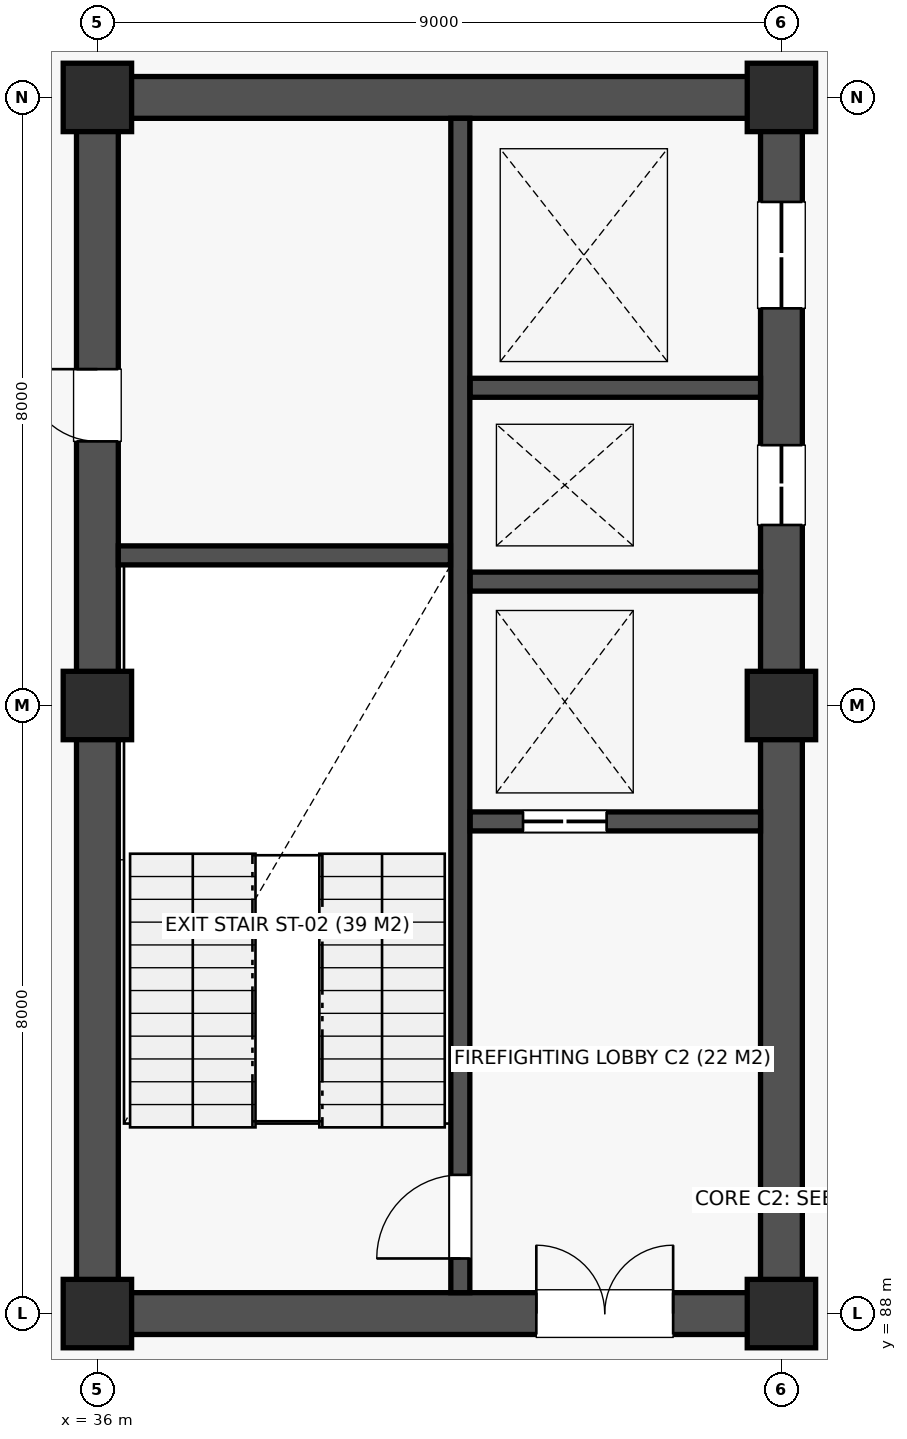
"""IFC4 building model, lengths in metres.
Left out: names, types, materials, properties, quantities, classifications, styles, units other than length and angle.
Written with IfcOpenShell. Run it as: python <this file> out.ifc"""

import sys

from ifc_helpers import new_model, si_unit, direction, frame, frame_2d, origin, origin_2d, place, context, subcontext, project, spatial, rectangle, extrude, element, fill, save


model = new_model("IFC4")
c1 = context("Model", 3, precision=1e-05, world=origin(), true_north=direction((0.0, 1.0)))
c2 = subcontext(c1, "Body", "Model", "MODEL_VIEW")
j1 = project(units=[si_unit("LENGTHUNIT", "METRE"), si_unit("PLANEANGLEUNIT", "RADIAN")], contexts=[c1])
p1 = place(None, origin())
s1 = spatial("IfcSite", under=j1, at=p1, CompositionType="ELEMENT")
p2 = place(p1, origin())
s2 = spatial("IfcBuilding", under=s1, at=p2, CompositionType="ELEMENT")
p3 = place(p2, frame((0.0, 0.0, 18.0)))
s3 = spatial("IfcBuildingStorey", under=s2, at=p3, CompositionType="ELEMENT", Elevation=18.0)
for number, where, z_axis, x_axis in (
    (1, (36.0, 88.0, 0.0), (0.0, 0.0, 1.0), (1.0, 0.0, 0.0)),
    (2, (36.0, 96.0, 0.0), (0.0, 0.0, 1.0), (1.0, 0.0, 0.0)),
    (3, (36.0, 104.0, 0.0), (0.0, 0.0, 1.0), (1.0, 0.0, 0.0)),
    (4, (45.0, 88.0, 0.0), (0.0, 0.0, 1.0), (1.0, 0.0, 0.0)),
    (5, (45.0, 96.0, 0.0), (0.0, 0.0, 1.0), (1.0, 0.0, 0.0)),
    (6, (45.0, 104.0, 0.0), (0.0, 0.0, 1.0), (1.0, 0.0, 0.0)),
):
    element("IfcColumn", number, at=place(p3, frame(where, z_axis=z_axis, x_axis=x_axis)), inside=s3, PredefinedType="COLUMN", context=c2, shape_type="SweptSolid", body=[
        extrude(rectangle(XDim=0.9, YDim=0.9, at=origin_2d()), origin(), (0.0, 0.0, 1.0), 3.9),
    ])
p4 = place(p3, frame((36.275, 88.0, 0.0), z_axis=(0.0, 0.0, 1.0), x_axis=(1.0, 0.0, 0.0)))
e7 = element("IfcWall", 7, at=p4, inside=s3, PredefinedType="SHEAR", context=c2, shape_type="SweptSolid", body=[
    extrude(rectangle(XDim=8.45, YDim=0.55, at=frame_2d((4.225, 0.0))), origin(), (0.0, 0.0, 1.0), 3.65),
])
p5 = place(p4, frame((5.5, 0.0, 0.0)))
e8 = element("IfcOpeningElement", 8, at=p5, cuts=e7, PredefinedType="OPENING", context=c2, shape_type="SweptSolid", body=[
    extrude(rectangle(XDim=1.8, YDim=2.18, at=frame_2d((0.9, 1.09))), frame((0.0, 0.287, 0.0), z_axis=(0.0, -1.0, 0.0), x_axis=(1.0, 0.0, 0.0)), (0.0, 0.0, 1.0), 0.574),
])
p6 = place(p3, frame((36.275, 104.0, 0.0), z_axis=(0.0, 0.0, 1.0), x_axis=(1.0, 0.0, 0.0)))
e9 = element("IfcWall", 9, at=p6, inside=s3, PredefinedType="SHEAR", context=c2, shape_type="SweptSolid", body=[
    extrude(rectangle(XDim=8.45, YDim=0.55, at=frame_2d((4.225, 0.0))), origin(), (0.0, 0.0, 1.0), 3.65),
])
p7 = place(p3, frame((36.0, 88.275, 0.0), z_axis=(0.0, 0.0, 1.0), x_axis=(0.0, 1.0, 0.0)))
e10 = element("IfcWall", 10, at=p7, inside=s3, PredefinedType="SHEAR", context=c2, shape_type="SweptSolid", body=[
    extrude(rectangle(XDim=15.45, YDim=0.55, at=frame_2d((7.725, 0.0))), origin(), (0.0, 0.0, 1.0), 3.65),
])
p8 = place(p7, frame((11.2, 0.0, 0.0)))
e11 = element("IfcOpeningElement", 11, at=p8, cuts=e10, PredefinedType="OPENING", context=c2, shape_type="SweptSolid", body=[
    extrude(rectangle(XDim=0.95, YDim=2.1, at=frame_2d((0.475, 1.05))), frame((0.0, 0.287, 0.0), z_axis=(0.0, -1.0, 0.0), x_axis=(1.0, 0.0, 0.0)), (0.0, 0.0, 1.0), 0.574),
])
p9 = place(p3, frame((45.0, 88.275, 0.0), z_axis=(0.0, 0.0, 1.0), x_axis=(0.0, 1.0, 0.0)))
e12 = element("IfcWall", 12, at=p9, inside=s3, PredefinedType="SHEAR", context=c2, shape_type="SweptSolid", body=[
    extrude(rectangle(XDim=15.45, YDim=0.55, at=frame_2d((7.725, 0.0))), origin(), (0.0, 0.0, 1.0), 3.65),
])
p10 = place(p9, frame((10.1, 0.0, 0.0)))
e13 = element("IfcOpeningElement", 13, at=p10, cuts=e12, PredefinedType="OPENING", context=c2, shape_type="SweptSolid", body=[
    extrude(rectangle(XDim=1.05, YDim=2.12, at=frame_2d((0.525, 1.06))), frame((0.0, 0.287, 0.0), z_axis=(0.0, -1.0, 0.0), x_axis=(1.0, 0.0, 0.0)), (0.0, 0.0, 1.0), 0.574),
])
p11 = place(p9, frame((12.95, 0.0, 0.0)))
e14 = element("IfcOpeningElement", 14, at=p11, cuts=e12, PredefinedType="OPENING", context=c2, shape_type="SweptSolid", body=[
    extrude(rectangle(XDim=1.4, YDim=2.2, at=frame_2d((0.7, 1.1))), frame((0.0, 0.287, 0.0), z_axis=(0.0, -1.0, 0.0), x_axis=(1.0, 0.0, 0.0)), (0.0, 0.0, 1.0), 0.574),
])
p12 = place(p3, frame((40.775, 88.275, 0.0), z_axis=(0.0, 0.0, 1.0), x_axis=(0.0, 1.0, 0.0)))
e15 = element("IfcWall", 15, at=p12, inside=s3, PredefinedType="SOLIDWALL", context=c2, shape_type="SweptSolid", body=[
    extrude(rectangle(XDim=15.45, YDim=0.25, at=frame_2d((7.725, 0.0))), origin(), (0.0, 0.0, 1.0), 3.65),
])
p13 = place(p12, frame((0.45, 0.0, 0.0)))
e16 = element("IfcOpeningElement", 16, at=p13, cuts=e15, PredefinedType="OPENING", context=c2, shape_type="SweptSolid", body=[
    extrude(rectangle(XDim=1.1, YDim=2.15, at=frame_2d((0.55, 1.075))), frame((0.0, 0.137, 0.0), z_axis=(0.0, -1.0, 0.0), x_axis=(1.0, 0.0, 0.0)), (0.0, 0.0, 1.0), 0.274),
])
p14 = place(p3, frame((36.275, 97.975, 0.0), z_axis=(0.0, 0.0, 1.0), x_axis=(1.0, 0.0, 0.0)))
e17 = element("IfcWall", 17, at=p14, inside=s3, PredefinedType="SOLIDWALL", context=c2, shape_type="SweptSolid", body=[
    extrude(rectangle(XDim=4.37, YDim=0.25, at=frame_2d((2.185, 0.0))), origin(), (0.0, 0.0, 1.0), 3.65),
])
p15 = place(p3, frame((40.905, 94.475, 0.0), z_axis=(0.0, 0.0, 1.0), x_axis=(1.0, 0.0, 0.0)))
e18 = element("IfcWall", 18, at=p15, inside=s3, PredefinedType="SOLIDWALL", context=c2, shape_type="SweptSolid", body=[
    extrude(rectangle(XDim=3.82, YDim=0.25, at=frame_2d((1.91, 0.0))), origin(), (0.0, 0.0, 1.0), 3.65),
])
p16 = place(p15, frame((0.695, 0.0, 0.0)))
e19 = element("IfcOpeningElement", 19, at=p16, cuts=e18, PredefinedType="OPENING", context=c2, shape_type="SweptSolid", body=[
    extrude(rectangle(XDim=1.1, YDim=2.12, at=frame_2d((0.55, 1.06))), frame((0.0, 0.137, 0.0), z_axis=(0.0, -1.0, 0.0), x_axis=(1.0, 0.0, 0.0)), (0.0, 0.0, 1.0), 0.274),
])
for number, where, z_axis, x_axis in (
    (20, (40.905, 97.63, 0.0), (0.0, 0.0, 1.0), (1.0, 0.0, 0.0)),
    (21, (40.905, 100.18, 0.0), (0.0, 0.0, 1.0), (1.0, 0.0, 0.0)),
):
    element("IfcWall", number, at=place(p3, frame(where, z_axis=z_axis, x_axis=x_axis)), inside=s3, PredefinedType="SOLIDWALL", context=c2, shape_type="SweptSolid", body=[
        extrude(rectangle(XDim=3.82, YDim=0.25, at=frame_2d((1.91, 0.0))), origin(), (0.0, 0.0, 1.0), 3.65),
    ])
p17 = place(p5, origin())
e22 = element("IfcDoor", 22, at=p17, inside=s3, OperationType="DOUBLE_DOOR_SINGLE_SWING", PredefinedType="DOOR", context=c2, shape_type="SweptSolid", body=[
    extrude(rectangle(XDim=1.8, YDim=2.18, at=frame_2d((0.9, 1.09))), frame((0.0, 0.025, 0.0), z_axis=(0.0, -1.0, 0.0), x_axis=(1.0, 0.0, 0.0)), (0.0, 0.0, 1.0), 0.05),
])
fill(e8, e22)
p18 = place(p13, origin())
e23 = element("IfcDoor", 23, at=p18, inside=s3, OperationType="SINGLE_SWING_LEFT", PredefinedType="DOOR", context=c2, shape_type="SweptSolid", body=[
    extrude(rectangle(XDim=1.1, YDim=2.15, at=frame_2d((0.55, 1.075))), frame((0.0, 0.025, 0.0), z_axis=(0.0, -1.0, 0.0), x_axis=(1.0, 0.0, 0.0)), (0.0, 0.0, 1.0), 0.05),
])
fill(e16, e23)
p19 = place(p8, origin())
e24 = element("IfcDoor", 24, at=p19, inside=s3, OperationType="SINGLE_SWING_RIGHT", PredefinedType="DOOR", context=c2, shape_type="SweptSolid", body=[
    extrude(rectangle(XDim=0.95, YDim=2.1, at=frame_2d((0.475, 1.05))), frame((0.0, 0.025, 0.0), z_axis=(0.0, -1.0, 0.0), x_axis=(1.0, 0.0, 0.0)), (0.0, 0.0, 1.0), 0.05),
])
fill(e11, e24)
p20 = place(p16, origin())
e25 = element("IfcDoor", 25, at=p20, inside=s3, OperationType="DOUBLE_DOOR_SLIDING", PredefinedType="DOOR", context=c2, shape_type="SweptSolid", body=[
    extrude(rectangle(XDim=1.1, YDim=2.12, at=frame_2d((0.55, 1.06))), frame((0.0, 0.025, 0.0), z_axis=(0.0, -1.0, 0.0), x_axis=(1.0, 0.0, 0.0)), (0.0, 0.0, 1.0), 0.05),
])
fill(e19, e25)
p21 = place(p10, origin())
e26 = element("IfcDoor", 26, at=p21, inside=s3, OperationType="DOUBLE_DOOR_SLIDING", PredefinedType="DOOR", context=c2, shape_type="SweptSolid", body=[
    extrude(rectangle(XDim=1.05, YDim=2.12, at=frame_2d((0.525, 1.06))), frame((0.0, 0.025, 0.0), z_axis=(0.0, -1.0, 0.0), x_axis=(1.0, 0.0, 0.0)), (0.0, 0.0, 1.0), 0.05),
])
fill(e13, e26)
p22 = place(p11, origin())
e27 = element("IfcDoor", 27, at=p22, inside=s3, OperationType="DOUBLE_DOOR_SLIDING", PredefinedType="DOOR", context=c2, shape_type="SweptSolid", body=[
    extrude(rectangle(XDim=1.4, YDim=2.2, at=frame_2d((0.7, 1.1))), frame((0.0, 0.025, 0.0), z_axis=(0.0, -1.0, 0.0), x_axis=(1.0, 0.0, 0.0)), (0.0, 0.0, 1.0), 0.05),
])
fill(e14, e27)
save(model, sys.argv[1])
